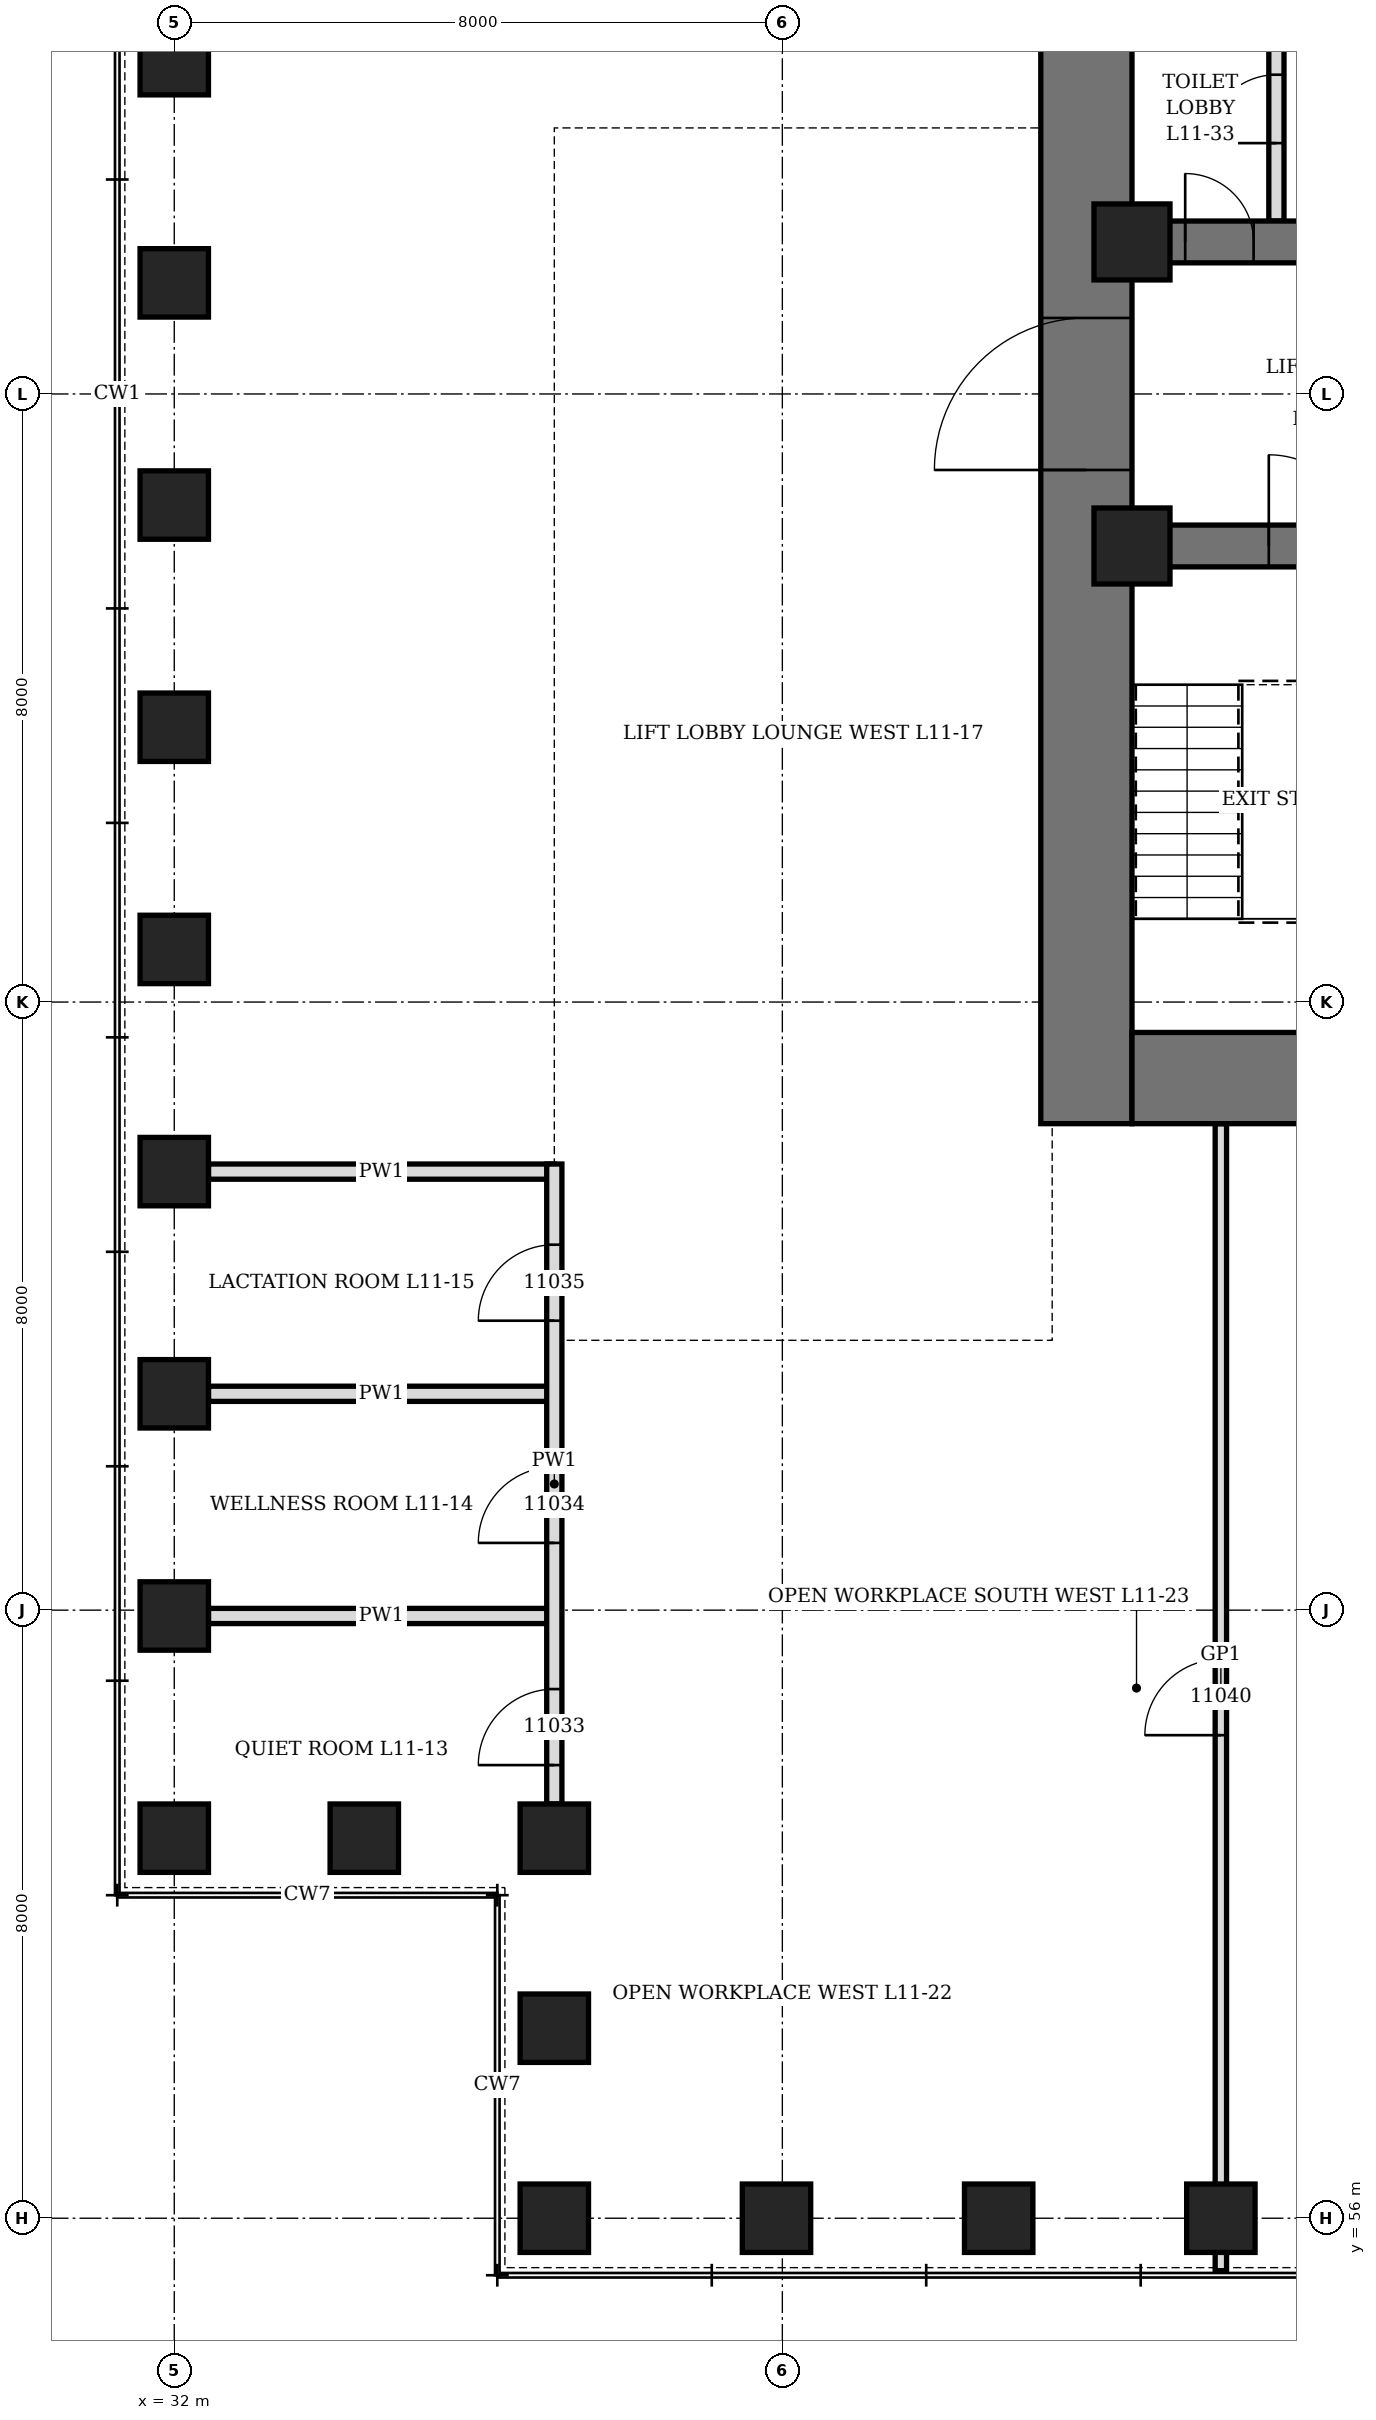
"""IFC4 building model, lengths in metres.
Left out: names, types, materials, properties, quantities, classifications, styles, units other than length and angle.
Written with IfcOpenShell. Run it as: python <this file> out.ifc"""

import sys

from ifc_helpers import new_model, si_unit, direction, frame, frame_2d, origin, origin_2d, place, context, subcontext, project, spatial, rectangle, hollow_rectangle, extrude, element, fill, save


model = new_model("IFC4")
c1 = context("Model", 3, precision=1e-05, world=origin(), true_north=direction((0.0, 1.0)))
c2 = subcontext(c1, "Body", "Model", "MODEL_VIEW")
j1 = project(units=[si_unit("LENGTHUNIT", "METRE"), si_unit("PLANEANGLEUNIT", "RADIAN")], contexts=[c1])
p1 = place(None, origin())
s1 = spatial("IfcSite", under=j1, at=p1, CompositionType="ELEMENT")
p2 = place(p1, origin())
s2 = spatial("IfcBuilding", under=s1, at=p2, CompositionType="ELEMENT")
p3 = place(p2, frame((0.0, 0.0, 55.9)))
s3 = spatial("IfcBuildingStorey", under=s2, at=p3, CompositionType="ELEMENT", Elevation=55.9)
for number, where, z_axis, x_axis in (
    (1, (37.0, 56.0, 0.0), (0.0, 0.0, 1.0), (1.0, 0.0, 0.0)),
    (2, (39.923, 56.0, 0.0), (0.0, 0.0, 1.0), (1.0, 0.0, 0.0)),
    (3, (42.846, 56.0, 0.0), (0.0, 0.0, 1.0), (1.0, 0.0, 0.0)),
    (4, (45.769, 56.0, 0.0), (0.0, 0.0, 1.0), (1.0, 0.0, 0.0)),
    (5, (32.0, 84.385, 0.0), (0.0, 0.0, 1.0), (0.0, 1.0, 0.0)),
    (6, (32.0, 81.461, 0.0), (0.0, 0.0, 1.0), (0.0, 1.0, 0.0)),
    (7, (32.0, 78.539, 0.0), (0.0, 0.0, 1.0), (0.0, 1.0, 0.0)),
    (8, (32.0, 75.615, 0.0), (0.0, 0.0, 1.0), (0.0, 1.0, 0.0)),
    (9, (32.0, 72.692, 0.0), (0.0, 0.0, 1.0), (0.0, 1.0, 0.0)),
    (10, (32.0, 69.769, 0.0), (0.0, 0.0, 1.0), (0.0, 1.0, 0.0)),
    (11, (32.0, 66.846, 0.0), (0.0, 0.0, 1.0), (0.0, 1.0, 0.0)),
    (12, (32.0, 63.923, 0.0), (0.0, 0.0, 1.0), (0.0, 1.0, 0.0)),
    (13, (32.0, 61.0, 0.0), (0.0, 0.0, 1.0), (1.0, 0.0, 0.0)),
    (14, (34.5, 61.0, 0.0), (0.0, 0.0, 1.0), (1.0, 0.0, 0.0)),
    (15, (37.0, 61.0, 0.0), (0.0, 0.0, 1.0), (0.0, 1.0, 0.0)),
    (16, (37.0, 58.5, 0.0), (0.0, 0.0, 1.0), (0.0, 1.0, 0.0)),
):
    element("IfcColumn", number, at=place(p3, frame(where, z_axis=z_axis, x_axis=x_axis)), inside=s3, PredefinedType="COLUMN", context=c2, shape_type="SweptSolid", body=[
        extrude(hollow_rectangle(XDim=0.9, YDim=0.9, WallThickness=0.12, at=origin_2d()), origin(), (0.0, 0.0, 1.0), 4.2),
    ])
p4 = place(p3, frame((44.0, 70.4, 0.0), z_axis=(0.0, 0.0, 1.0), x_axis=(0.0, 1.0, 0.0)))
e17 = element("IfcWall", 17, at=p4, inside=s3, PredefinedType="SHEAR", context=c2, shape_type="SweptSolid", body=[
    extrude(rectangle(XDim=19.2, YDim=1.2, at=frame_2d((9.6, 0.0))), origin(), (0.0, 0.0, 1.0), 4.2),
])
p5 = place(p4, frame((8.6, 0.0, 0.0)))
e18 = element("IfcOpeningElement", 18, at=p5, cuts=e17, PredefinedType="OPENING", context=c2, shape_type="SweptSolid", body=[
    extrude(rectangle(XDim=2.0, YDim=2.4, at=frame_2d((1.0, 1.2))), frame((0.0, 0.61, 0.0), z_axis=(0.0, -1.0, 0.0), x_axis=(1.0, 0.0, 0.0)), (0.0, 0.0, 1.0), 1.22),
])
p6 = place(p3, frame((44.6, 71.0, 0.0), z_axis=(0.0, 0.0, 1.0), x_axis=(1.0, 0.0, 0.0)))
e19 = element("IfcWall", 19, at=p6, inside=s3, PredefinedType="SHEAR", context=c2, shape_type="SweptSolid", body=[
    extrude(rectangle(XDim=22.8, YDim=1.2, at=frame_2d((11.4, 0.0))), origin(), (0.0, 0.0, 1.0), 4.2),
])
p7 = place(p3, frame((44.6, 78.0, 0.0), z_axis=(0.0, 0.0, 1.0), x_axis=(1.0, 0.0, 0.0)))
e20 = element("IfcWall", 20, at=p7, inside=s3, PredefinedType="SHEAR", context=c2, shape_type="SweptSolid", body=[
    extrude(rectangle(XDim=5.125, YDim=0.55, at=frame_2d((2.562, 0.0))), origin(), (0.0, 0.0, 1.0), 4.2),
])
p8 = place(p7, frame((1.8, 0.0, 0.0)))
e21 = element("IfcOpeningElement", 21, at=p8, cuts=e20, PredefinedType="OPENING", context=c2, shape_type="SweptSolid", body=[
    extrude(rectangle(XDim=1.2, YDim=2.1, at=frame_2d((0.6, 1.05))), frame((0.0, 0.285, 0.0), z_axis=(0.0, -1.0, 0.0), x_axis=(1.0, 0.0, 0.0)), (0.0, 0.0, 1.0), 0.57),
])
p9 = place(p3, frame((44.6, 82.0, 0.0), z_axis=(0.0, 0.0, 1.0), x_axis=(1.0, 0.0, 0.0)))
e22 = element("IfcWall", 22, at=p9, inside=s3, PredefinedType="SHEAR", context=c2, shape_type="SweptSolid", body=[
    extrude(rectangle(XDim=5.125, YDim=0.55, at=frame_2d((2.562, 0.0))), origin(), (0.0, 0.0, 1.0), 4.2),
])
p10 = place(p9, frame((0.7, 0.0, 0.0)))
e23 = element("IfcOpeningElement", 23, at=p10, cuts=e22, PredefinedType="OPENING", context=c2, shape_type="SweptSolid", body=[
    extrude(rectangle(XDim=0.9, YDim=2.1, at=frame_2d((0.45, 1.05))), frame((0.0, 0.285, 0.0), z_axis=(0.0, -1.0, 0.0), x_axis=(1.0, 0.0, 0.0)), (0.0, 0.0, 1.0), 0.57),
])
for number, where, z_axis, x_axis in (
    (24, (44.6, 78.0, 0.0), (0.0, 0.0, 1.0), (1.0, 0.0, 0.0)),
    (25, (44.6, 82.0, 0.0), (0.0, 0.0, 1.0), (1.0, 0.0, 0.0)),
):
    element("IfcColumn", number, at=place(p3, frame(where, z_axis=z_axis, x_axis=x_axis)), inside=s3, PredefinedType="COLUMN", context=c2, shape_type="SweptSolid", body=[
        extrude(hollow_rectangle(XDim=1.0, YDim=1.0, WallThickness=0.15, at=origin_2d()), origin(), (0.0, 0.0, 1.0), 4.2),
    ])
p11 = place(p3, frame((46.5, 82.275, 0.0), z_axis=(0.0, 0.0, 1.0), x_axis=(0.0, 1.0, 0.0)))
e26 = element("IfcWall", 26, at=p11, inside=s3, PredefinedType="PARTITIONING", context=c2, shape_type="SweptSolid", body=[
    extrude(rectangle(XDim=2.95, YDim=0.2, at=frame_2d((1.475, 0.0))), origin(), (0.0, 0.0, 1.0), 4.04),
])
p12 = place(p11, frame((1.025, 0.0, 0.0)))
e27 = element("IfcOpeningElement", 27, at=p12, cuts=e26, PredefinedType="OPENING", context=c2, shape_type="SweptSolid", body=[
    extrude(rectangle(XDim=0.9, YDim=2.1, at=frame_2d((0.45, 1.05))), frame((0.0, 0.11, 0.0), z_axis=(0.0, -1.0, 0.0), x_axis=(1.0, 0.0, 0.0)), (0.0, 0.0, 1.0), 0.22),
])
for number, where, z_axis, x_axis in (
    (28, (32.45, 63.923, 0.0), (0.0, 0.0, 1.0), (1.0, 0.0, 0.0)),
    (29, (32.45, 66.846, 0.0), (0.0, 0.0, 1.0), (1.0, 0.0, 0.0)),
    (30, (32.45, 69.769, 0.0), (0.0, 0.0, 1.0), (1.0, 0.0, 0.0)),
):
    element("IfcWall", number, at=place(p3, frame(where, z_axis=z_axis, x_axis=x_axis)), inside=s3, PredefinedType="PARTITIONING", context=c2, shape_type="SweptSolid", body=[
        extrude(rectangle(XDim=4.55, YDim=0.2, at=frame_2d((2.275, 0.0))), origin(), (0.0, 0.0, 1.0), 3.428),
    ])
p13 = place(p3, frame((37.0, 61.45, 0.0), z_axis=(0.0, 0.0, 1.0), x_axis=(0.0, 1.0, 0.0)))
e31 = element("IfcWall", 31, at=p13, inside=s3, PredefinedType="PARTITIONING", context=c2, shape_type="SweptSolid", body=[
    extrude(rectangle(XDim=8.419, YDim=0.2, at=frame_2d((4.209, 0.0))), origin(), (0.0, 0.0, 1.0), 4.04),
])
p14 = place(p13, frame((0.511, 0.0, 0.0)))
e32 = element("IfcOpeningElement", 32, at=p14, cuts=e31, PredefinedType="OPENING", context=c2, shape_type="SweptSolid", body=[
    extrude(rectangle(XDim=1.0, YDim=2.1, at=frame_2d((0.5, 1.05))), frame((0.0, 0.11, 0.0), z_axis=(0.0, -1.0, 0.0), x_axis=(1.0, 0.0, 0.0)), (0.0, 0.0, 1.0), 0.22),
])
p15 = place(p13, frame((3.435, 0.0, 0.0)))
e33 = element("IfcOpeningElement", 33, at=p15, cuts=e31, PredefinedType="OPENING", context=c2, shape_type="SweptSolid", body=[
    extrude(rectangle(XDim=1.0, YDim=2.1, at=frame_2d((0.5, 1.05))), frame((0.0, 0.11, 0.0), z_axis=(0.0, -1.0, 0.0), x_axis=(1.0, 0.0, 0.0)), (0.0, 0.0, 1.0), 0.22),
])
p16 = place(p13, frame((6.358, 0.0, 0.0)))
e34 = element("IfcOpeningElement", 34, at=p16, cuts=e31, PredefinedType="OPENING", context=c2, shape_type="SweptSolid", body=[
    extrude(rectangle(XDim=1.0, YDim=2.1, at=frame_2d((0.5, 1.05))), frame((0.0, 0.11, 0.0), z_axis=(0.0, -1.0, 0.0), x_axis=(1.0, 0.0, 0.0)), (0.0, 0.0, 1.0), 0.22),
])
p17 = place(p3, frame((45.769, 55.31, 0.0), z_axis=(0.0, 0.0, 1.0), x_axis=(0.0, 1.0, 0.0)))
e35 = element("IfcWall", 35, at=p17, inside=s3, PredefinedType="PARTITIONING", context=c2, shape_type="SweptSolid", body=[
    extrude(rectangle(XDim=15.09, YDim=0.15, at=frame_2d((7.545, 0.0))), origin(), (0.0, 0.0, 1.0), 3.278),
])
p18 = place(p17, frame((7.045, 0.0, 0.0)))
e36 = element("IfcOpeningElement", 36, at=p18, cuts=e35, PredefinedType="OPENING", context=c2, shape_type="SweptSolid", body=[
    extrude(rectangle(XDim=1.0, YDim=2.4, at=frame_2d((0.5, 1.2))), frame((0.0, 0.085, 0.0), z_axis=(0.0, -1.0, 0.0), x_axis=(1.0, 0.0, 0.0)), (0.0, 0.0, 1.0), 0.17),
])
p19 = place(p10, origin())
e37 = element("IfcDoor", 37, at=p19, inside=s3, OperationType="SINGLE_SWING_LEFT", PredefinedType="DOOR", context=c2, shape_type="SweptSolid", body=[
    extrude(rectangle(XDim=0.9, YDim=2.1, at=frame_2d((0.45, 1.05))), frame((0.0, 0.275, 0.0), z_axis=(0.0, -1.0, 0.0), x_axis=(1.0, 0.0, 0.0)), (0.0, 0.0, 1.0), 0.55),
])
fill(e23, e37)
p20 = place(p12, origin())
e38 = element("IfcDoor", 38, at=p20, inside=s3, OperationType="SINGLE_SWING_RIGHT", PredefinedType="DOOR", context=c2, shape_type="SweptSolid", body=[
    extrude(rectangle(XDim=0.9, YDim=2.1, at=frame_2d((0.45, 1.05))), frame((0.0, 0.1, 0.0), z_axis=(0.0, -1.0, 0.0), x_axis=(1.0, 0.0, 0.0)), (0.0, 0.0, 1.0), 0.199),
])
fill(e27, e38)
p21 = place(p8, origin())
e39 = element("IfcDoor", 39, at=p21, inside=s3, OperationType="SINGLE_SWING_LEFT", PredefinedType="DOOR", context=c2, shape_type="SweptSolid", body=[
    extrude(rectangle(XDim=1.2, YDim=2.1, at=frame_2d((0.6, 1.05))), frame((0.0, 0.275, 0.0), z_axis=(0.0, -1.0, 0.0), x_axis=(1.0, 0.0, 0.0)), (0.0, 0.0, 1.0), 0.55),
])
fill(e21, e39)
p22 = place(p5, origin())
e40 = element("IfcDoor", 40, at=p22, inside=s3, OperationType="DOUBLE_DOOR_SINGLE_SWING", PredefinedType="DOOR", context=c2, shape_type="SweptSolid", body=[
    extrude(rectangle(XDim=2.0, YDim=2.4, at=frame_2d((1.0, 1.2))), frame((0.0, 0.35, 0.0), z_axis=(0.0, -1.0, 0.0), x_axis=(1.0, 0.0, 0.0)), (0.0, 0.0, 1.0), 0.7),
])
fill(e18, e40)
p23 = place(p14, origin())
e41 = element("IfcDoor", 41, at=p23, inside=s3, OperationType="SINGLE_SWING_LEFT", PredefinedType="DOOR", context=c2, shape_type="SweptSolid", body=[
    extrude(rectangle(XDim=1.0, YDim=2.1, at=frame_2d((0.5, 1.05))), frame((0.0, 0.1, 0.0), z_axis=(0.0, -1.0, 0.0), x_axis=(1.0, 0.0, 0.0)), (0.0, 0.0, 1.0), 0.199),
])
fill(e32, e41)
p24 = place(p15, origin())
e42 = element("IfcDoor", 42, at=p24, inside=s3, OperationType="SINGLE_SWING_LEFT", PredefinedType="DOOR", context=c2, shape_type="SweptSolid", body=[
    extrude(rectangle(XDim=1.0, YDim=2.1, at=frame_2d((0.5, 1.05))), frame((0.0, 0.1, 0.0), z_axis=(0.0, -1.0, 0.0), x_axis=(1.0, 0.0, 0.0)), (0.0, 0.0, 1.0), 0.199),
])
fill(e33, e42)
p25 = place(p16, origin())
e43 = element("IfcDoor", 43, at=p25, inside=s3, OperationType="SINGLE_SWING_LEFT", PredefinedType="DOOR", context=c2, shape_type="SweptSolid", body=[
    extrude(rectangle(XDim=1.0, YDim=2.1, at=frame_2d((0.5, 1.05))), frame((0.0, 0.1, 0.0), z_axis=(0.0, -1.0, 0.0), x_axis=(1.0, 0.0, 0.0)), (0.0, 0.0, 1.0), 0.199),
])
fill(e34, e43)
p26 = place(p18, origin())
e44 = element("IfcDoor", 44, at=p26, inside=s3, OperationType="SINGLE_SWING_RIGHT", PredefinedType="DOOR", context=c2, shape_type="SweptSolid", body=[
    extrude(rectangle(XDim=1.0, YDim=2.4, at=frame_2d((0.5, 1.2))), frame((0.0, 0.075, 0.0), z_axis=(0.0, -1.0, 0.0), x_axis=(1.0, 0.0, 0.0)), (0.0, 0.0, 1.0), 0.149),
])
fill(e36, e44)
save(model, sys.argv[1])
